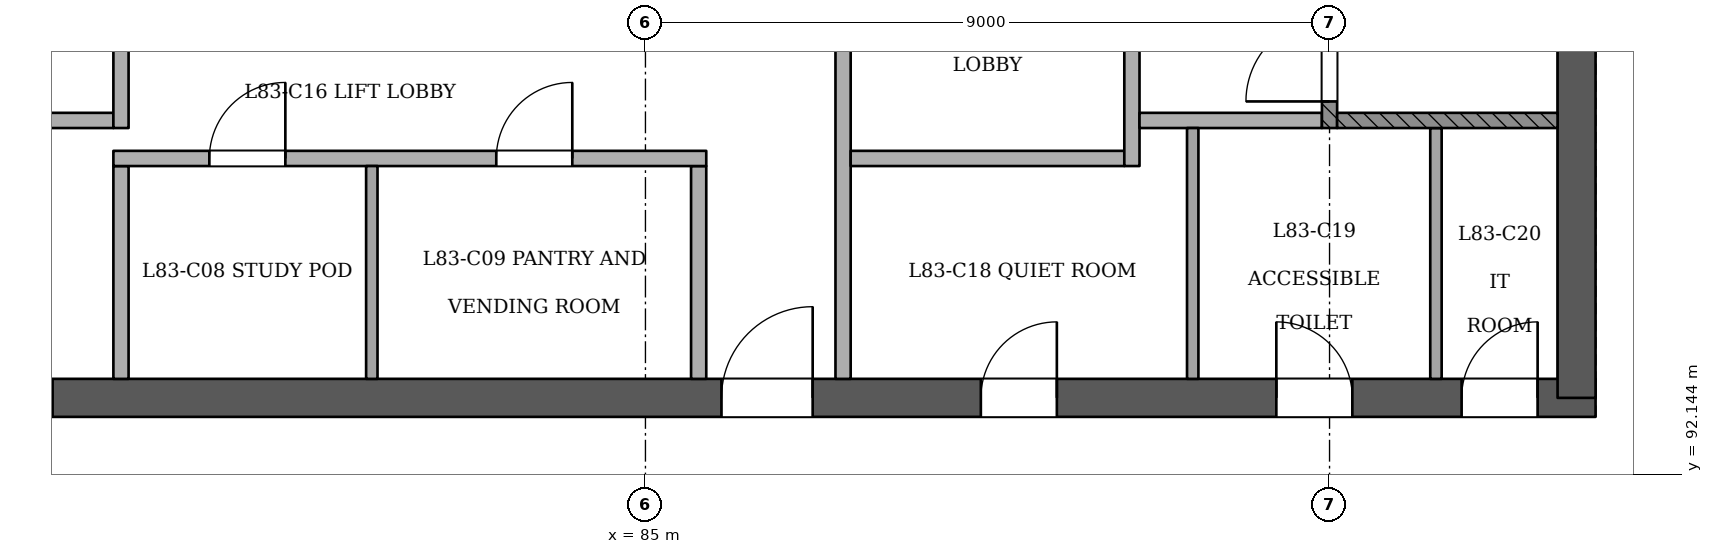
"""IFC4 building model, lengths in metres.
Left out: names, types, materials, properties, quantities, classifications, styles, units other than length and angle.
Written with IfcOpenShell. Run it as: python <this file> out.ifc"""

import sys

from ifc_helpers import new_model, si_unit, direction, frame, frame_2d, origin, place, context, subcontext, project, spatial, rectangle, extrude, element, fill, save


model = new_model("IFC4")
c1 = context("Model", 3, precision=1e-05, world=origin(), true_north=direction((0.0, 1.0)))
c2 = subcontext(c1, "Body", "Model", "MODEL_VIEW")
j1 = project(units=[si_unit("LENGTHUNIT", "METRE"), si_unit("PLANEANGLEUNIT", "RADIAN")], contexts=[c1])
p1 = place(None, origin())
s1 = spatial("IfcSite", under=j1, at=p1, CompositionType="ELEMENT")
p2 = place(p1, origin())
s2 = spatial("IfcBuilding", under=s1, at=p2, CompositionType="ELEMENT")
p3 = place(p2, frame((0.0, 0.0, 320.2)))
s3 = spatial("IfcBuildingStorey", under=s2, at=p3, CompositionType="ELEMENT", Elevation=320.2)
p4 = place(p3, frame((72.75, 93.15, 0.0), z_axis=(0.0, 0.0, 1.0), x_axis=(1.0, 0.0, 0.0)))
e1 = element("IfcWall", 1, at=p4, inside=s3, PredefinedType="SHEAR", context=c2, shape_type="SweptSolid", body=[
    extrude(rectangle(XDim=24.75, YDim=0.5, at=frame_2d((12.375, 0.0))), origin(), (0.0, 0.0, 1.0), 3.6),
])
p5 = place(p4, frame((1.05, 0.0, 0.0)))
e2 = element("IfcOpeningElement", 2, at=p5, cuts=e1, PredefinedType="OPENING", context=c2, shape_type="SweptSolid", body=[
    extrude(rectangle(XDim=1.2, YDim=2.1, at=frame_2d((0.6, 1.05))), frame((0.0, 0.26, 0.0), z_axis=(0.0, -1.0, 0.0), x_axis=(1.0, 0.0, 0.0)), (0.0, 0.0, 1.0), 0.521),
])
p6 = place(p4, frame((3.25, 0.0, 0.0)))
e3 = element("IfcOpeningElement", 3, at=p6, cuts=e1, PredefinedType="OPENING", context=c2, shape_type="SweptSolid", body=[
    extrude(rectangle(XDim=1.2, YDim=2.1, at=frame_2d((0.6, 1.05))), frame((0.0, 0.26, 0.0), z_axis=(0.0, -1.0, 0.0), x_axis=(1.0, 0.0, 0.0)), (0.0, 0.0, 1.0), 0.521),
])
p7 = place(p4, frame((13.25, 0.0, 0.0)))
e4 = element("IfcOpeningElement", 4, at=p7, cuts=e1, PredefinedType="OPENING", context=c2, shape_type="SweptSolid", body=[
    extrude(rectangle(XDim=1.2, YDim=2.1, at=frame_2d((0.6, 1.05))), frame((0.0, 0.26, 0.0), z_axis=(0.0, -1.0, 0.0), x_axis=(1.0, 0.0, 0.0)), (0.0, 0.0, 1.0), 0.521),
])
p8 = place(p4, frame((16.663, 0.0, 0.0)))
e5 = element("IfcOpeningElement", 5, at=p8, cuts=e1, PredefinedType="OPENING", context=c2, shape_type="SweptSolid", body=[
    extrude(rectangle(XDim=1.0, YDim=2.1, at=frame_2d((0.5, 1.05))), frame((0.0, 0.26, 0.0), z_axis=(0.0, -1.0, 0.0), x_axis=(1.0, 0.0, 0.0)), (0.0, 0.0, 1.0), 0.521),
])
p9 = place(p4, frame((20.55, 0.0, 0.0)))
e6 = element("IfcOpeningElement", 6, at=p9, cuts=e1, PredefinedType="OPENING", context=c2, shape_type="SweptSolid", body=[
    extrude(rectangle(XDim=1.0, YDim=2.1, at=frame_2d((0.5, 1.05))), frame((0.0, 0.26, 0.0), z_axis=(0.0, -1.0, 0.0), x_axis=(1.0, 0.0, 0.0)), (0.0, 0.0, 1.0), 0.521),
])
p10 = place(p4, frame((22.988, 0.0, 0.0)))
e7 = element("IfcOpeningElement", 7, at=p10, cuts=e1, PredefinedType="OPENING", context=c2, shape_type="SweptSolid", body=[
    extrude(rectangle(XDim=1.0, YDim=2.1, at=frame_2d((0.5, 1.05))), frame((0.0, 0.26, 0.0), z_axis=(0.0, -1.0, 0.0), x_axis=(1.0, 0.0, 0.0)), (0.0, 0.0, 1.0), 0.521),
])
p11 = place(p3, frame((97.25, 93.15, 0.0), z_axis=(0.0, 0.0, 1.0), x_axis=(0.0, 1.0, 0.0)))
e8 = element("IfcWall", 8, at=p11, inside=s3, PredefinedType="SHEAR", context=c2, shape_type="SweptSolid", body=[
    extrude(rectangle(XDim=10.75, YDim=0.5, at=frame_2d((5.375, 0.0))), origin(), (0.0, 0.0, 1.0), 3.6),
])
p12 = place(p3, frame((78.1, 93.4, 0.0), z_axis=(0.0, 0.0, 1.0), x_axis=(0.0, 1.0, 0.0)))
e9 = element("IfcWall", 9, at=p12, inside=s3, PredefinedType="PARTITIONING", context=c2, shape_type="SweptSolid", body=[
    extrude(rectangle(XDim=2.8, YDim=0.2, at=frame_2d((1.4, 0.0))), origin(), (0.0, 0.0, 1.0), 3.2),
])
p13 = place(p3, frame((81.4, 93.4, 0.0), z_axis=(0.0, 0.0, 1.0), x_axis=(0.0, 1.0, 0.0)))
e10 = element("IfcWall", 10, at=p13, inside=s3, PredefinedType="PARTITIONING", context=c2, shape_type="SweptSolid", body=[
    extrude(rectangle(XDim=2.8, YDim=0.15, at=frame_2d((1.4, 0.0))), origin(), (0.0, 0.0, 1.0), 3.2),
])
p14 = place(p3, frame((85.7, 93.4, 0.0), z_axis=(0.0, 0.0, 1.0), x_axis=(0.0, 1.0, 0.0)))
e11 = element("IfcWall", 11, at=p14, inside=s3, PredefinedType="PARTITIONING", context=c2, shape_type="SweptSolid", body=[
    extrude(rectangle(XDim=2.8, YDim=0.2, at=frame_2d((1.4, 0.0))), origin(), (0.0, 0.0, 1.0), 3.2),
])
p15 = place(p3, frame((87.6, 93.4, 0.0), z_axis=(0.0, 0.0, 1.0), x_axis=(0.0, 1.0, 0.0)))
e12 = element("IfcWall", 12, at=p15, inside=s3, PredefinedType="PARTITIONING", context=c2, shape_type="SweptSolid", body=[
    extrude(rectangle(XDim=7.0, YDim=0.2, at=frame_2d((3.5, 0.0))), origin(), (0.0, 0.0, 1.0), 3.2),
])
p16 = place(p15, frame((4.45, 0.0, 0.0)))
e13 = element("IfcOpeningElement", 13, at=p16, cuts=e12, PredefinedType="OPENING", context=c2, shape_type="SweptSolid", body=[
    extrude(rectangle(XDim=1.1, YDim=2.1, at=frame_2d((0.55, 1.05))), frame((0.0, 0.11, 0.0), z_axis=(0.0, -1.0, 0.0), x_axis=(1.0, 0.0, 0.0)), (0.0, 0.0, 1.0), 0.221),
])
for number, where, z_axis, x_axis in (
    (14, (92.2, 93.4, 0.0), (0.0, 0.0, 1.0), (0.0, 1.0, 0.0)),
    (15, (95.4, 93.4, 0.0), (0.0, 0.0, 1.0), (0.0, 1.0, 0.0)),
):
    element("IfcWall", number, at=place(p3, frame(where, z_axis=z_axis, x_axis=x_axis)), inside=s3, PredefinedType="PARTITIONING", context=c2, shape_type="SweptSolid", body=[
        extrude(rectangle(XDim=3.3, YDim=0.15, at=frame_2d((1.65, 0.0))), origin(), (0.0, 0.0, 1.0), 3.2),
    ])
p17 = place(p3, frame((78.0, 96.3, 0.0), z_axis=(0.0, 0.0, 1.0), x_axis=(1.0, 0.0, 0.0)))
e16 = element("IfcWall", 16, at=p17, inside=s3, PredefinedType="PARTITIONING", context=c2, shape_type="SweptSolid", body=[
    extrude(rectangle(XDim=7.8, YDim=0.2, at=frame_2d((3.9, 0.0))), origin(), (0.0, 0.0, 1.0), 3.2),
])
p18 = place(p17, frame((1.262, 0.0, 0.0)))
e17 = element("IfcOpeningElement", 17, at=p18, cuts=e16, PredefinedType="OPENING", context=c2, shape_type="SweptSolid", body=[
    extrude(rectangle(XDim=1.0, YDim=2.1, at=frame_2d((0.5, 1.05))), frame((0.0, 0.11, 0.0), z_axis=(0.0, -1.0, 0.0), x_axis=(1.0, 0.0, 0.0)), (0.0, 0.0, 1.0), 0.221),
])
p19 = place(p17, frame((5.038, 0.0, 0.0)))
e18 = element("IfcOpeningElement", 18, at=p19, cuts=e16, PredefinedType="OPENING", context=c2, shape_type="SweptSolid", body=[
    extrude(rectangle(XDim=1.0, YDim=2.1, at=frame_2d((0.5, 1.05))), frame((0.0, 0.11, 0.0), z_axis=(0.0, -1.0, 0.0), x_axis=(1.0, 0.0, 0.0)), (0.0, 0.0, 1.0), 0.221),
])
p20 = place(p3, frame((87.7, 96.3, 0.0), z_axis=(0.0, 0.0, 1.0), x_axis=(1.0, 0.0, 0.0)))
e19 = element("IfcWall", 19, at=p20, inside=s3, PredefinedType="PARTITIONING", context=c2, shape_type="SweptSolid", body=[
    extrude(rectangle(XDim=3.6, YDim=0.2, at=frame_2d((1.8, 0.0))), origin(), (0.0, 0.0, 1.0), 3.2),
])
p21 = place(p3, frame((91.4, 96.2, 0.0), z_axis=(0.0, 0.0, 1.0), x_axis=(0.0, 1.0, 0.0)))
e20 = element("IfcWall", 20, at=p21, inside=s3, PredefinedType="PARTITIONING", context=c2, shape_type="SweptSolid", body=[
    extrude(rectangle(XDim=4.2, YDim=0.2, at=frame_2d((2.1, 0.0))), origin(), (0.0, 0.0, 1.0), 3.2),
])
p22 = place(p21, frame((2.45, 0.0, 0.0)))
e21 = element("IfcOpeningElement", 21, at=p22, cuts=e20, PredefinedType="OPENING", context=c2, shape_type="SweptSolid", body=[
    extrude(rectangle(XDim=1.1, YDim=2.1, at=frame_2d((0.55, 1.05))), frame((0.0, 0.11, 0.0), z_axis=(0.0, -1.0, 0.0), x_axis=(1.0, 0.0, 0.0)), (0.0, 0.0, 1.0), 0.221),
])
p23 = place(p3, frame((76.1, 96.8, 0.0), z_axis=(0.0, 0.0, 1.0), x_axis=(1.0, 0.0, 0.0)))
e22 = element("IfcWall", 22, at=p23, inside=s3, PredefinedType="PARTITIONING", context=c2, shape_type="SweptSolid", body=[
    extrude(rectangle(XDim=1.9, YDim=0.2, at=frame_2d((0.95, 0.0))), origin(), (0.0, 0.0, 1.0), 3.2),
])
p24 = place(p3, frame((78.1, 96.7, 0.0), z_axis=(0.0, 0.0, 1.0), x_axis=(0.0, 1.0, 0.0)))
e23 = element("IfcWall", 23, at=p24, inside=s3, PredefinedType="PARTITIONING", context=c2, shape_type="SweptSolid", body=[
    extrude(rectangle(XDim=3.7, YDim=0.2, at=frame_2d((1.85, 0.0))), origin(), (0.0, 0.0, 1.0), 3.2),
])
p25 = place(p24, frame((1.95, 0.0, 0.0)))
e24 = element("IfcOpeningElement", 24, at=p25, cuts=e23, PredefinedType="OPENING", context=c2, shape_type="SweptSolid", body=[
    extrude(rectangle(XDim=1.1, YDim=2.1, at=frame_2d((0.55, 1.05))), frame((0.0, 0.11, 0.0), z_axis=(0.0, -1.0, 0.0), x_axis=(1.0, 0.0, 0.0)), (0.0, 0.0, 1.0), 0.221),
])
p26 = place(p3, frame((91.5, 96.8, 0.0), z_axis=(0.0, 0.0, 1.0), x_axis=(1.0, 0.0, 0.0)))
e25 = element("IfcWall", 25, at=p26, inside=s3, PredefinedType="PARTITIONING", context=c2, shape_type="SweptSolid", body=[
    extrude(rectangle(XDim=2.4, YDim=0.2, at=frame_2d((1.2, 0.0))), origin(), (0.0, 0.0, 1.0), 3.2),
])
p27 = place(p3, frame((94.0, 96.7, 0.0), z_axis=(0.0, 0.0, 1.0), x_axis=(0.0, 1.0, 0.0)))
e26 = element("IfcWall", 26, at=p27, inside=s3, PredefinedType="SOLIDWALL", context=c2, shape_type="SweptSolid", body=[
    extrude(rectangle(XDim=3.7, YDim=0.2, at=frame_2d((1.85, 0.0))), origin(), (0.0, 0.0, 1.0), 3.2),
])
p28 = place(p27, frame((0.35, 0.0, 0.0)))
e27 = element("IfcOpeningElement", 27, at=p28, cuts=e26, PredefinedType="OPENING", context=c2, shape_type="SweptSolid", body=[
    extrude(rectangle(XDim=1.1, YDim=2.1, at=frame_2d((0.55, 1.05))), frame((0.0, 0.11, 0.0), z_axis=(0.0, -1.0, 0.0), x_axis=(1.0, 0.0, 0.0)), (0.0, 0.0, 1.0), 0.221),
])
p29 = place(p3, frame((94.1, 96.8, 0.0), z_axis=(0.0, 0.0, 1.0), x_axis=(1.0, 0.0, 0.0)))
e28 = element("IfcWall", 28, at=p29, inside=s3, PredefinedType="SOLIDWALL", context=c2, shape_type="SweptSolid", body=[
    extrude(rectangle(XDim=2.9, YDim=0.2, at=frame_2d((1.45, 0.0))), origin(), (0.0, 0.0, 1.0), 3.2),
])
p30 = place(p28, origin())
e29 = element("IfcDoor", 29, at=p30, inside=s3, OperationType="SINGLE_SWING_LEFT", PredefinedType="NOTDEFINED", context=c2, shape_type="SweptSolid", body=[
    extrude(rectangle(XDim=1.1, YDim=2.1, at=frame_2d((0.55, 1.05))), frame((0.0, 0.025, 0.0), z_axis=(0.0, -1.0, 0.0), x_axis=(1.0, 0.0, 0.0)), (0.0, 0.0, 1.0), 0.05),
])
fill(e27, e29)
p31 = place(p6, origin())
e30 = element("IfcDoor", 30, at=p31, inside=s3, OperationType="SINGLE_SWING_LEFT", PredefinedType="NOTDEFINED", context=c2, shape_type="SweptSolid", body=[
    extrude(rectangle(XDim=1.2, YDim=2.1, at=frame_2d((0.6, 1.05))), frame((0.0, 0.025, 0.0), z_axis=(0.0, -1.0, 0.0), x_axis=(1.0, 0.0, 0.0)), (0.0, 0.0, 1.0), 0.05),
])
fill(e3, e30)
p32 = place(p7, origin())
e31 = element("IfcDoor", 31, at=p32, inside=s3, OperationType="SINGLE_SWING_RIGHT", PredefinedType="NOTDEFINED", context=c2, shape_type="SweptSolid", body=[
    extrude(rectangle(XDim=1.2, YDim=2.1, at=frame_2d((0.6, 1.05))), frame((0.0, 0.025, 0.0), z_axis=(0.0, -1.0, 0.0), x_axis=(1.0, 0.0, 0.0)), (0.0, 0.0, 1.0), 0.05),
])
fill(e4, e31)
p33 = place(p8, origin())
e32 = element("IfcDoor", 32, at=p33, inside=s3, OperationType="SINGLE_SWING_RIGHT", PredefinedType="NOTDEFINED", context=c2, shape_type="SweptSolid", body=[
    extrude(rectangle(XDim=1.0, YDim=2.1, at=frame_2d((0.5, 1.05))), frame((0.0, 0.025, 0.0), z_axis=(0.0, -1.0, 0.0), x_axis=(1.0, 0.0, 0.0)), (0.0, 0.0, 1.0), 0.05),
])
fill(e5, e32)
p34 = place(p9, origin())
e33 = element("IfcDoor", 33, at=p34, inside=s3, OperationType="SINGLE_SWING_LEFT", PredefinedType="NOTDEFINED", context=c2, shape_type="SweptSolid", body=[
    extrude(rectangle(XDim=1.0, YDim=2.1, at=frame_2d((0.5, 1.05))), frame((0.0, 0.025, 0.0), z_axis=(0.0, -1.0, 0.0), x_axis=(1.0, 0.0, 0.0)), (0.0, 0.0, 1.0), 0.05),
])
fill(e6, e33)
p35 = place(p10, origin())
e34 = element("IfcDoor", 34, at=p35, inside=s3, OperationType="SINGLE_SWING_RIGHT", PredefinedType="NOTDEFINED", context=c2, shape_type="SweptSolid", body=[
    extrude(rectangle(XDim=1.0, YDim=2.1, at=frame_2d((0.5, 1.05))), frame((0.0, 0.025, 0.0), z_axis=(0.0, -1.0, 0.0), x_axis=(1.0, 0.0, 0.0)), (0.0, 0.0, 1.0), 0.05),
])
fill(e7, e34)
p36 = place(p18, origin())
e35 = element("IfcDoor", 35, at=p36, inside=s3, OperationType="SINGLE_SWING_RIGHT", PredefinedType="NOTDEFINED", context=c2, shape_type="SweptSolid", body=[
    extrude(rectangle(XDim=1.0, YDim=2.1, at=frame_2d((0.5, 1.05))), frame((0.0, 0.025, 0.0), z_axis=(0.0, -1.0, 0.0), x_axis=(1.0, 0.0, 0.0)), (0.0, 0.0, 1.0), 0.05),
])
fill(e17, e35)
p37 = place(p19, origin())
e36 = element("IfcDoor", 36, at=p37, inside=s3, OperationType="SINGLE_SWING_RIGHT", PredefinedType="NOTDEFINED", context=c2, shape_type="SweptSolid", body=[
    extrude(rectangle(XDim=1.0, YDim=2.1, at=frame_2d((0.5, 1.05))), frame((0.0, 0.025, 0.0), z_axis=(0.0, -1.0, 0.0), x_axis=(1.0, 0.0, 0.0)), (0.0, 0.0, 1.0), 0.05),
])
fill(e18, e36)
save(model, sys.argv[1])
